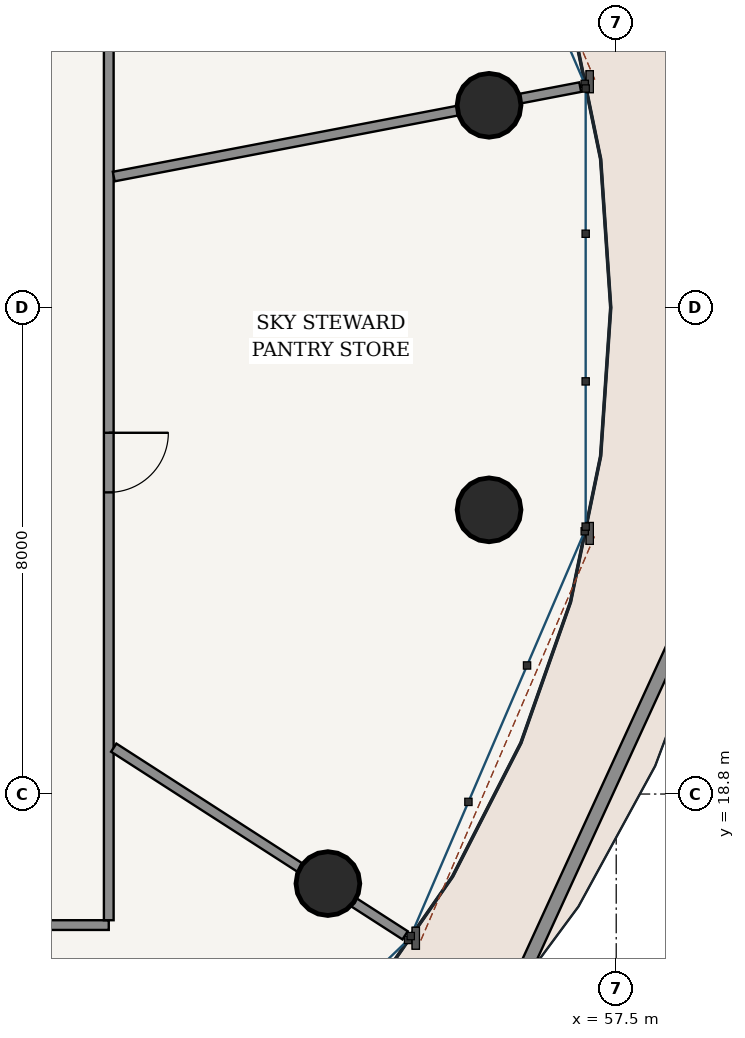
"""IFC4 building model, lengths in metres.
Left out: names, types, materials, properties, quantities, classifications, styles, units other than length and angle.
Written with IfcOpenShell. Run it as: python <this file> out.ifc"""

import sys

from ifc_helpers import new_model, si_unit, direction, frame, frame_2d, origin, origin_2d, place, context, subcontext, project, spatial, rectangle, hollow_circle, extrude, source, transform, mapped, element, fill, save


model = new_model("IFC4")
c1 = context("Model", 3, precision=1e-05, world=origin(), true_north=direction((-0.2419218956, 0.970295726276)))
c2 = subcontext(c1, "Body", "Model", "MODEL_VIEW")
j1 = project(units=[si_unit("LENGTHUNIT", "METRE"), si_unit("PLANEANGLEUNIT", "RADIAN")], contexts=[c1])
p1 = place(None, origin())
s1 = spatial("IfcSite", under=j1, at=p1, CompositionType="ELEMENT")
p2 = place(p1, origin())
s2 = spatial("IfcBuilding", under=s1, at=p2, CompositionType="ELEMENT")
p3 = place(p2, frame((0.0, 0.0, 243.0)))
s3 = spatial("IfcBuildingStorey", under=s2, at=p3, CompositionType="ELEMENT", Elevation=243.0)
for number, where, z_axis, x_axis in (
    (1, (55.409, 30.126, 0.0), (0.0, 0.0, 1.0), (1.0, 0.0, 0.0)),
    (2, (52.759, 17.328, 0.0), (0.0, 0.0, 1.0), (1.0, 0.0, 0.0)),
    (3, (55.409, 23.474, 0.0), (0.0, 0.0, 1.0), (1.0, 0.0, 0.0)),
):
    element("IfcColumn", number, at=place(p3, frame(where, z_axis=z_axis, x_axis=x_axis)), inside=s3, PredefinedType="COLUMN", context=c2, shape_type="SweptSolid", body=[
        extrude(hollow_circle(Radius=0.525, WallThickness=0.035, at=origin_2d()), origin(), (0.0, 0.0, 1.0), 5.2),
    ])
for number, where, z_axis, x_axis in (
    (4, (59.244, 30.616, 0.0), (0.0, 0.0, 1.0), (-0.417, 0.909, 0.0)),
    (5, (56.01, 15.933, 0.0), (0.0, 0.0, 1.0), (0.417, 0.909, 0.0)),
):
    element("IfcWall", number, at=place(p3, frame(where, z_axis=z_axis, x_axis=x_axis)), inside=s3, PredefinedType="PARAPET", context=c2, shape_type="SweptSolid", body=[
        extrude(rectangle(XDim=7.758, YDim=0.22, at=frame_2d((3.879, 0.0))), origin(), (0.0, 0.0, 1.0), 1.15),
    ])
p4 = place(p3, frame((26.845, 16.645, 0.0), z_axis=(0.0, 0.0, 1.0), x_axis=(1.0, 0.0, 0.0)))
e6 = element("IfcWall", 6, at=p4, inside=s3, PredefinedType="PARTITIONING", context=c2, shape_type="SweptSolid", body=[
    extrude(rectangle(XDim=22.31, YDim=0.16, at=frame_2d((11.155, 0.0))), origin(), (0.0, 0.0, 1.0), 4.465),
])
p5 = place(p4, frame((4.236, 0.0, 0.0)))
e7 = element("IfcOpeningElement", 7, at=p5, cuts=e6, PredefinedType="OPENING", context=c2, shape_type="SweptSolid", body=[
    extrude(rectangle(XDim=0.86, YDim=2.1, at=frame_2d((0.43, 1.05))), frame((0.0, 0.09, 0.0), z_axis=(0.0, -1.0, 0.0), x_axis=(1.0, 0.0, 0.0)), (0.0, 0.0, 1.0), 0.18),
])
p6 = place(p4, frame((15.042, 0.0, 0.0)))
e8 = element("IfcOpeningElement", 8, at=p6, cuts=e6, PredefinedType="OPENING", context=c2, shape_type="SweptSolid", body=[
    extrude(rectangle(XDim=0.98, YDim=2.2, at=frame_2d((0.49, 1.1))), frame((0.0, 0.09, 0.0), z_axis=(0.0, -1.0, 0.0), x_axis=(1.0, 0.0, 0.0)), (0.0, 0.0, 1.0), 0.18),
])
p7 = place(p3, frame((49.155, 16.725, 0.0), z_axis=(0.0, 0.0, 1.0), x_axis=(0.0, 1.0, 0.0)))
e9 = element("IfcWall", 9, at=p7, inside=s3, PredefinedType="PARTITIONING", context=c2, shape_type="SweptSolid", body=[
    extrude(rectangle(XDim=20.15, YDim=0.16, at=frame_2d((10.075, 0.0))), origin(), (0.0, 0.0, 1.0), 4.465),
])
p8 = place(p7, frame((7.036, 0.0, 0.0)))
e10 = element("IfcOpeningElement", 10, at=p8, cuts=e9, PredefinedType="OPENING", context=c2, shape_type="SweptSolid", body=[
    extrude(rectangle(XDim=0.98, YDim=2.2, at=frame_2d((0.49, 1.1))), frame((0.0, 0.09, 0.0), z_axis=(0.0, -1.0, 0.0), x_axis=(1.0, 0.0, 0.0)), (0.0, 0.0, 1.0), 0.18),
])
p9 = place(p3, frame((49.237, 28.955, 0.0), z_axis=(0.0, 0.0, 1.0), x_axis=(0.982113524201, 0.188289738385, 0.0)))
e11 = element("IfcWall", 11, at=p9, inside=s3, PredefinedType="PARTITIONING", context=c2, shape_type="SweptSolid", body=[
    extrude(rectangle(XDim=7.811, YDim=0.16, at=frame_2d((3.905, 0.0))), origin(), (0.0, 0.0, 1.0), 4.465),
])
p10 = place(p3, frame((49.237, 19.563, 0.0), z_axis=(0.0, 0.0, 1.0), x_axis=(0.84072312105, -0.54146526549, 0.0)))
e12 = element("IfcWall", 12, at=p10, inside=s3, PredefinedType="PARTITIONING", context=c2, shape_type="SweptSolid", body=[
    extrude(rectangle(XDim=5.7, YDim=0.16, at=frame_2d((2.85, 0.0))), origin(), (0.0, 0.0, 1.0), 4.465),
])
m1 = source(origin(), c2, "Body", "SweptSolid", [
    extrude(rectangle(XDim=0.98, YDim=2.2, at=frame_2d((0.49, 1.1))), frame((0.0, 0.025, 0.0), z_axis=(0.0, -1.0, 0.0), x_axis=(1.0, 0.0, 0.0)), (0.0, 0.0, 1.0), 0.05),
])
p11 = place(p8, frame((0.98, 0.0, 0.0), z_axis=(0.0, 0.0, 1.0), x_axis=(-1.0, 0.0, 0.0)))
e13 = element("IfcDoor", 13, at=p11, inside=s3, OperationType="SINGLE_SWING_LEFT", PredefinedType="DOOR", context=c2, shape_type="MappedRepresentation", body=[
    mapped(m1, transform((0.0, 0.0, 0.0), scale=1.0)),
])
fill(e10, e13)
save(model, sys.argv[1])
